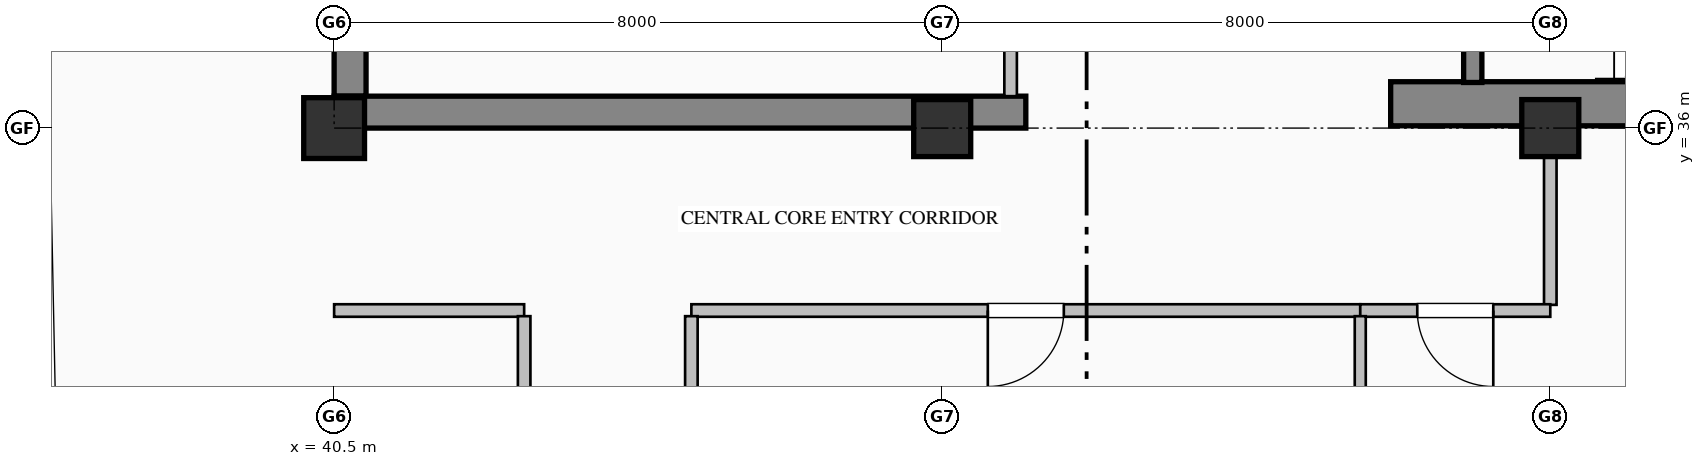
"""IFC4 building model, lengths in metres.
Left out: names, types, materials, properties, quantities, classifications, styles, units other than length and angle.
Written with IfcOpenShell. Run it as: python <this file> out.ifc"""

import sys

from ifc_helpers import new_model, si_unit, direction, frame, frame_2d, origin, origin_2d, place, context, subcontext, project, spatial, rectangle, hollow_rectangle, extrude, element, fill, save


model = new_model("IFC4")
c1 = context("Model", 3, precision=1e-05, world=origin(), true_north=direction((0.0, 1.0)))
c2 = subcontext(c1, "Body", "Model", "MODEL_VIEW")
j1 = project(units=[si_unit("LENGTHUNIT", "METRE"), si_unit("PLANEANGLEUNIT", "RADIAN")], contexts=[c1])
p1 = place(None, origin())
s1 = spatial("IfcSite", under=j1, at=p1, CompositionType="ELEMENT")
p2 = place(p1, origin())
s2 = spatial("IfcBuilding", under=s1, at=p2, CompositionType="ELEMENT")
p3 = place(p2, frame((0.0, 0.0, 347.2)))
s3 = spatial("IfcBuildingStorey", under=s2, at=p3, CompositionType="ELEMENT", Elevation=347.2)
p4 = place(p3, frame((40.71, 36.42, 0.0), z_axis=(0.0, 0.0, 1.0), x_axis=(0.0, 1.0, 0.0)))
e1 = element("IfcWall", 1, at=p4, inside=s3, PredefinedType="SHEAR", context=c2, shape_type="SweptSolid", body=[
    extrude(rectangle(XDim=7.98, YDim=0.42, at=frame_2d((3.99, 0.0))), origin(), (0.0, 0.0, 1.0), 3.785),
])
p5 = place(p3, frame((40.5, 36.21, 0.0), z_axis=(0.0, 0.0, 1.0), x_axis=(1.0, 0.0, 0.0)))
e2 = element("IfcWall", 2, at=p5, inside=s3, PredefinedType="SHEAR", context=c2, shape_type="SweptSolid", body=[
    extrude(rectangle(XDim=9.1, YDim=0.42, at=frame_2d((4.55, 0.0))), origin(), (0.0, 0.0, 1.0), 3.785),
])
p6 = place(p3, frame((54.4, 36.32, 0.0), z_axis=(0.0, 0.0, 1.0), x_axis=(1.0, 0.0, 0.0)))
e3 = element("IfcWall", 3, at=p6, inside=s3, PredefinedType="SHEAR", context=c2, shape_type="SweptSolid", body=[
    extrude(rectangle(XDim=9.6, YDim=0.58, at=frame_2d((4.8, 0.0))), origin(), (0.0, 0.0, 1.0), 4.0),
])
p7 = place(p3, frame((40.5, 36.0, 0.0), z_axis=(0.0, 0.0, 1.0), x_axis=(1.0, 0.0, 0.0)))
e4 = element("IfcColumn", 4, at=p7, inside=s3, PredefinedType="COLUMN", context=c2, shape_type="SweptSolid", body=[
    extrude(hollow_rectangle(XDim=0.8, YDim=0.8, WallThickness=0.032, at=origin_2d()), origin(), (0.0, 0.0, 1.0), 4.0),
])
for number, where, z_axis, x_axis in (
    (5, (48.5, 36.0, 0.0), (0.0, 0.0, 1.0), (1.0, 0.0, 0.0)),
    (6, (56.5, 36.0, 0.0), (0.0, 0.0, 1.0), (1.0, 0.0, 0.0)),
):
    element("IfcColumn", number, at=place(p3, frame(where, z_axis=z_axis, x_axis=x_axis)), inside=s3, PredefinedType="COLUMN", context=c2, shape_type="SweptSolid", body=[
        extrude(rectangle(XDim=0.75, YDim=0.75, at=origin_2d()), origin(), (0.0, 0.0, 1.0), 4.0),
    ])
p8 = place(p3, frame((55.48, 39.75, 0.0), z_axis=(0.0, 0.0, 1.0), x_axis=(0.0, -1.0, 0.0)))
e7 = element("IfcWall", 7, at=p8, inside=s3, PredefinedType="SOLIDWALL", context=c2, shape_type="SweptSolid", body=[
    extrude(rectangle(XDim=3.15, YDim=0.24, at=frame_2d((1.575, 0.0))), origin(), (0.0, 0.0, 1.0), 4.0),
])
p9 = place(p8, frame((1.0, 0.0, 0.0)))
e8 = element("IfcOpeningElement", 8, at=p9, cuts=e7, PredefinedType="OPENING", context=c2, shape_type="SweptSolid", body=[
    extrude(rectangle(XDim=1.15, YDim=2.2, at=frame_2d((0.575, 1.1))), frame((0.0, 0.13, 0.0), z_axis=(0.0, -1.0, 0.0), x_axis=(1.0, 0.0, 0.0)), (0.0, 0.0, 1.0), 0.26),
])
p10 = place(p3, frame((49.4, 36.42, 0.0), z_axis=(0.0, 0.0, 1.0), x_axis=(0.0, 1.0, 0.0)))
e9 = element("IfcWall", 9, at=p10, inside=s3, PredefinedType="PARTITIONING", context=c2, shape_type="SweptSolid", body=[
    extrude(rectangle(XDim=3.893, YDim=0.165, at=frame_2d((1.947, 0.0))), origin(), (0.0, 0.0, 1.0), 3.027),
])
p11 = place(p10, frame((1.497, 0.0, 0.0)))
e10 = element("IfcOpeningElement", 10, at=p11, cuts=e9, PredefinedType="OPENING", context=c2, shape_type="SweptSolid", body=[
    extrude(rectangle(XDim=0.9, YDim=2.15, at=frame_2d((0.45, 1.075))), frame((0.0, 0.093, 0.0), z_axis=(0.0, -1.0, 0.0), x_axis=(1.0, 0.0, 0.0)), (0.0, 0.0, 1.0), 0.185),
])
p12 = place(p3, frame((54.0, 33.6, 0.0), z_axis=(0.0, 0.0, 1.0), x_axis=(-1.0, 0.0, 0.0)))
e11 = element("IfcWall", 11, at=p12, inside=s3, PredefinedType="PARTITIONING", context=c2, shape_type="SweptSolid", body=[
    extrude(rectangle(XDim=8.8, YDim=0.165, at=frame_2d((4.4, 0.0))), origin(), (0.0, 0.0, 1.0), 3.785),
])
p13 = place(p12, frame((3.9, 0.0, 0.0)))
e12 = element("IfcOpeningElement", 12, at=p13, cuts=e11, PredefinedType="OPENING", context=c2, shape_type="SweptSolid", body=[
    extrude(rectangle(XDim=1.0, YDim=2.15, at=frame_2d((0.5, 1.075))), frame((0.0, 0.093, 0.0), z_axis=(0.0, -1.0, 0.0), x_axis=(1.0, 0.0, 0.0)), (0.0, 0.0, 1.0), 0.185),
])
p14 = place(p3, frame((56.5, 36.0, 0.0), z_axis=(0.0, 0.0, 1.0), x_axis=(0.0, -1.0, 0.0)))
e13 = element("IfcWall", 13, at=p14, inside=s3, PredefinedType="PARTITIONING", context=c2, shape_type="SweptSolid", body=[
    extrude(rectangle(XDim=2.325, YDim=0.165, at=frame_2d((1.163, 0.0))), origin(), (0.0, 0.0, 1.0), 3.177),
])
p15 = place(p3, frame((56.5, 33.6, 0.0), z_axis=(0.0, 0.0, 1.0), x_axis=(-1.0, 0.0, 0.0)))
e14 = element("IfcWall", 14, at=p15, inside=s3, PredefinedType="PARTITIONING", context=c2, shape_type="SweptSolid", body=[
    extrude(rectangle(XDim=2.5, YDim=0.165, at=frame_2d((1.25, 0.0))), origin(), (0.0, 0.0, 1.0), 3.785),
])
p16 = place(p15, frame((0.75, 0.0, 0.0)))
e15 = element("IfcOpeningElement", 15, at=p16, cuts=e14, PredefinedType="OPENING", context=c2, shape_type="SweptSolid", body=[
    extrude(rectangle(XDim=1.0, YDim=2.15, at=frame_2d((0.5, 1.075))), frame((0.0, 0.093, 0.0), z_axis=(0.0, -1.0, 0.0), x_axis=(1.0, 0.0, 0.0)), (0.0, 0.0, 1.0), 0.185),
])
p17 = place(p3, frame((43.0, 33.6, 0.0), z_axis=(0.0, 0.0, 1.0), x_axis=(-1.0, 0.0, 0.0)))
e16 = element("IfcWall", 16, at=p17, inside=s3, PredefinedType="PARTITIONING", context=c2, shape_type="SweptSolid", body=[
    extrude(rectangle(XDim=2.5, YDim=0.165, at=frame_2d((1.25, 0.0))), origin(), (0.0, 0.0, 1.0), 3.785),
])
p18 = place(p3, frame((45.2, 33.525, 0.0), z_axis=(0.0, 0.0, 1.0), x_axis=(0.0, -1.0, 0.0)))
e17 = element("IfcWall", 17, at=p18, inside=s3, PredefinedType="PARTITIONING", context=c2, shape_type="SweptSolid", body=[
    extrude(rectangle(XDim=2.961, YDim=0.165, at=frame_2d((1.48, 0.0))), origin(), (0.0, 0.0, 1.0), 3.785),
])
p19 = place(p3, frame((43.0, 22.875, 0.0), z_axis=(0.0, 0.0, 1.0), x_axis=(0.0, 1.0, 0.0)))
e18 = element("IfcWall", 18, at=p19, inside=s3, PredefinedType="PARTITIONING", context=c2, shape_type="SweptSolid", body=[
    extrude(rectangle(XDim=10.651, YDim=0.165, at=frame_2d((5.325, 0.0))), origin(), (0.0, 0.0, 1.0), 3.785),
])
p20 = place(p19, frame((4.875, 0.0, 0.0)))
e19 = element("IfcOpeningElement", 19, at=p20, cuts=e18, PredefinedType="OPENING", context=c2, shape_type="SweptSolid", body=[
    extrude(rectangle(XDim=0.9, YDim=2.15, at=frame_2d((0.45, 1.075))), frame((0.0, 0.093, 0.0), z_axis=(0.0, -1.0, 0.0), x_axis=(1.0, 0.0, 0.0)), (0.0, 0.0, 1.0), 0.185),
])
p21 = place(p3, frame((54.0, 33.525, 0.0), z_axis=(0.0, 0.0, 1.0), x_axis=(0.0, -1.0, 0.0)))
e20 = element("IfcWall", 20, at=p21, inside=s3, PredefinedType="PARTITIONING", context=c2, shape_type="SweptSolid", body=[
    extrude(rectangle(XDim=2.961, YDim=0.145, at=frame_2d((1.48, 0.0))), origin(), (0.0, 0.0, 1.0), 3.785),
])
p22 = place(p13, origin())
e21 = element("IfcDoor", 21, at=p22, inside=s3, OperationType="SINGLE_SWING_RIGHT", PredefinedType="DOOR", context=c2, shape_type="SweptSolid", body=[
    extrude(rectangle(XDim=1.0, YDim=2.15, at=frame_2d((0.5, 1.075))), frame((0.0, 0.025, 0.0), z_axis=(0.0, -1.0, 0.0), x_axis=(1.0, 0.0, 0.0)), (0.0, 0.0, 1.0), 0.05),
])
fill(e12, e21)
p23 = place(p16, origin())
e22 = element("IfcDoor", 22, at=p23, inside=s3, OperationType="SINGLE_SWING_LEFT", PredefinedType="DOOR", context=c2, shape_type="SweptSolid", body=[
    extrude(rectangle(XDim=1.0, YDim=2.15, at=frame_2d((0.5, 1.075))), frame((0.0, 0.025, 0.0), z_axis=(0.0, -1.0, 0.0), x_axis=(1.0, 0.0, 0.0)), (0.0, 0.0, 1.0), 0.05),
])
fill(e15, e22)
save(model, sys.argv[1])
